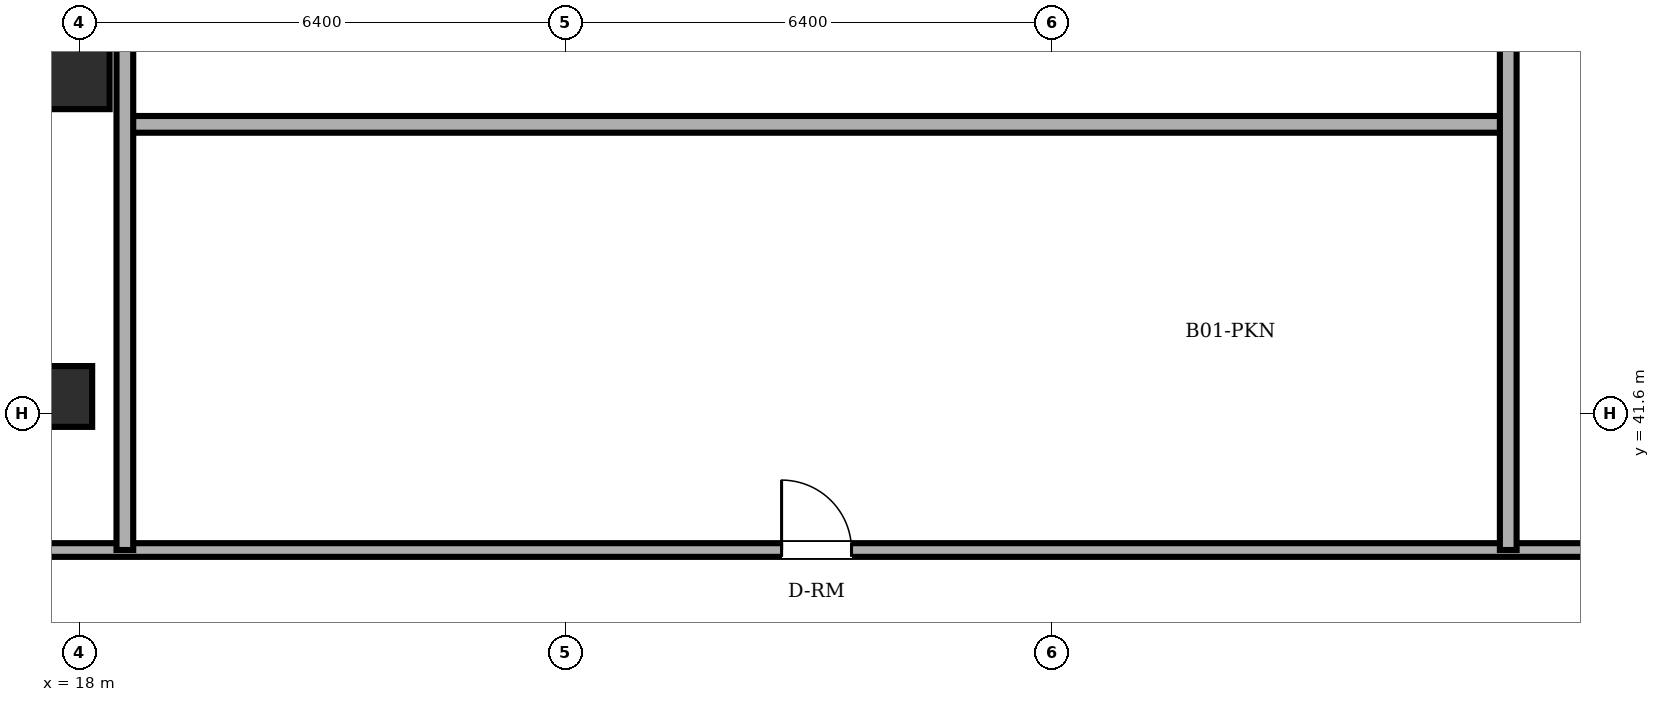
"""IFC4 building model, lengths in metres.
Left out: names, types, materials, properties, quantities, classifications, styles, units other than length and angle.
Written with IfcOpenShell. Run it as: python <this file> out.ifc"""

import sys

from ifc_helpers import new_model, si_unit, direction, frame, frame_2d, origin, origin_2d, place, context, subcontext, project, spatial, rectangle, extrude, element, fill, save


model = new_model("IFC4")
c1 = context("Model", 3, precision=1e-05, world=origin(), true_north=direction((0.0, 1.0)))
c2 = subcontext(c1, "Body", "Model", "MODEL_VIEW")
j1 = project(units=[si_unit("LENGTHUNIT", "METRE"), si_unit("PLANEANGLEUNIT", "RADIAN")], contexts=[c1])
p1 = place(None, origin())
s1 = spatial("IfcSite", under=j1, at=p1, CompositionType="ELEMENT")
p2 = place(p1, origin())
s2 = spatial("IfcBuilding", under=s1, at=p2, CompositionType="ELEMENT")
p3 = place(p2, frame((0.0, 0.0, -4.2)))
s3 = spatial("IfcBuildingStorey", under=s2, at=p3, CompositionType="ELEMENT", Elevation=-4.2)
for number, where, z_axis, x_axis in (
    (1, (18.0, 46.0, 0.0), (0.0, 0.0, 1.0), (1.0, 0.0, 0.0)),
    (2, (17.77, 41.82, 0.0), (0.0, 0.0, 1.0), (1.0, 0.0, 0.0)),
):
    element("IfcColumn", number, at=place(p3, frame(where, z_axis=z_axis, x_axis=x_axis)), inside=s3, PredefinedType="COLUMN", context=c2, shape_type="SweptSolid", body=[
        extrude(rectangle(XDim=0.8, YDim=0.8, at=origin_2d()), origin(), (0.0, 0.0, 1.0), 4.2),
    ])
p4 = place(p3, frame((8.5, 39.8, 0.0), z_axis=(0.0, 0.0, 1.0), x_axis=(1.0, 0.0, 0.0)))
e3 = element("IfcWall", 3, at=p4, inside=s3, PredefinedType="PARTITIONING", context=c2, shape_type="SweptSolid", body=[
    extrude(rectangle(XDim=49.9, YDim=0.18, at=frame_2d((24.95, 0.0))), origin(), (0.0, 0.0, 1.0), 3.96),
])
p5 = place(p4, frame((18.74, 0.0, 0.0)))
e4 = element("IfcOpeningElement", 4, at=p5, cuts=e3, PredefinedType="OPENING", context=c2, shape_type="SweptSolid", body=[
    extrude(rectangle(XDim=0.92, YDim=2.1, at=frame_2d((0.46, 1.05))), frame((0.0, 0.1, 0.0), z_axis=(0.0, -1.0, 0.0), x_axis=(1.0, 0.0, 0.0)), (0.0, 0.0, 1.0), 0.2),
])
p6 = place(p3, frame((18.6, 45.4, 0.0), z_axis=(0.0, 0.0, 1.0), x_axis=(1.0, 0.0, 0.0)))
e5 = element("IfcWall", 5, at=p6, inside=s3, PredefinedType="PARTITIONING", context=c2, shape_type="SweptSolid", body=[
    extrude(rectangle(XDim=18.2, YDim=0.22, at=frame_2d((9.1, 0.0))), origin(), (0.0, 0.0, 1.0), 3.96),
])
p7 = place(p3, frame((18.6, 39.8, 0.0), z_axis=(0.0, 0.0, 1.0), x_axis=(0.0, 1.0, 0.0)))
e6 = element("IfcWall", 6, at=p7, inside=s3, PredefinedType="PARTITIONING", context=c2, shape_type="SweptSolid", body=[
    extrude(rectangle(XDim=8.2, YDim=0.22, at=frame_2d((4.1, 0.0))), origin(), (0.0, 0.0, 1.0), 2.742),
])
p8 = place(p3, frame((36.8, 39.8, 0.0), z_axis=(0.0, 0.0, 1.0), x_axis=(0.0, 1.0, 0.0)))
e7 = element("IfcWall", 7, at=p8, inside=s3, PredefinedType="PARTITIONING", context=c2, shape_type="SweptSolid", body=[
    extrude(rectangle(XDim=8.2, YDim=0.22, at=frame_2d((4.1, 0.0))), origin(), (0.0, 0.0, 1.0), 3.96),
])
p9 = place(p5, origin())
e8 = element("IfcDoor", 8, at=p9, inside=s3, OperationType="SINGLE_SWING_LEFT", PredefinedType="DOOR", context=c2, shape_type="SweptSolid", body=[
    extrude(rectangle(XDim=0.92, YDim=2.1, at=frame_2d((0.46, 1.05))), frame((0.0, 0.025, 0.0), z_axis=(0.0, -1.0, 0.0), x_axis=(1.0, 0.0, 0.0)), (0.0, 0.0, 1.0), 0.05),
])
fill(e4, e8)
save(model, sys.argv[1])
